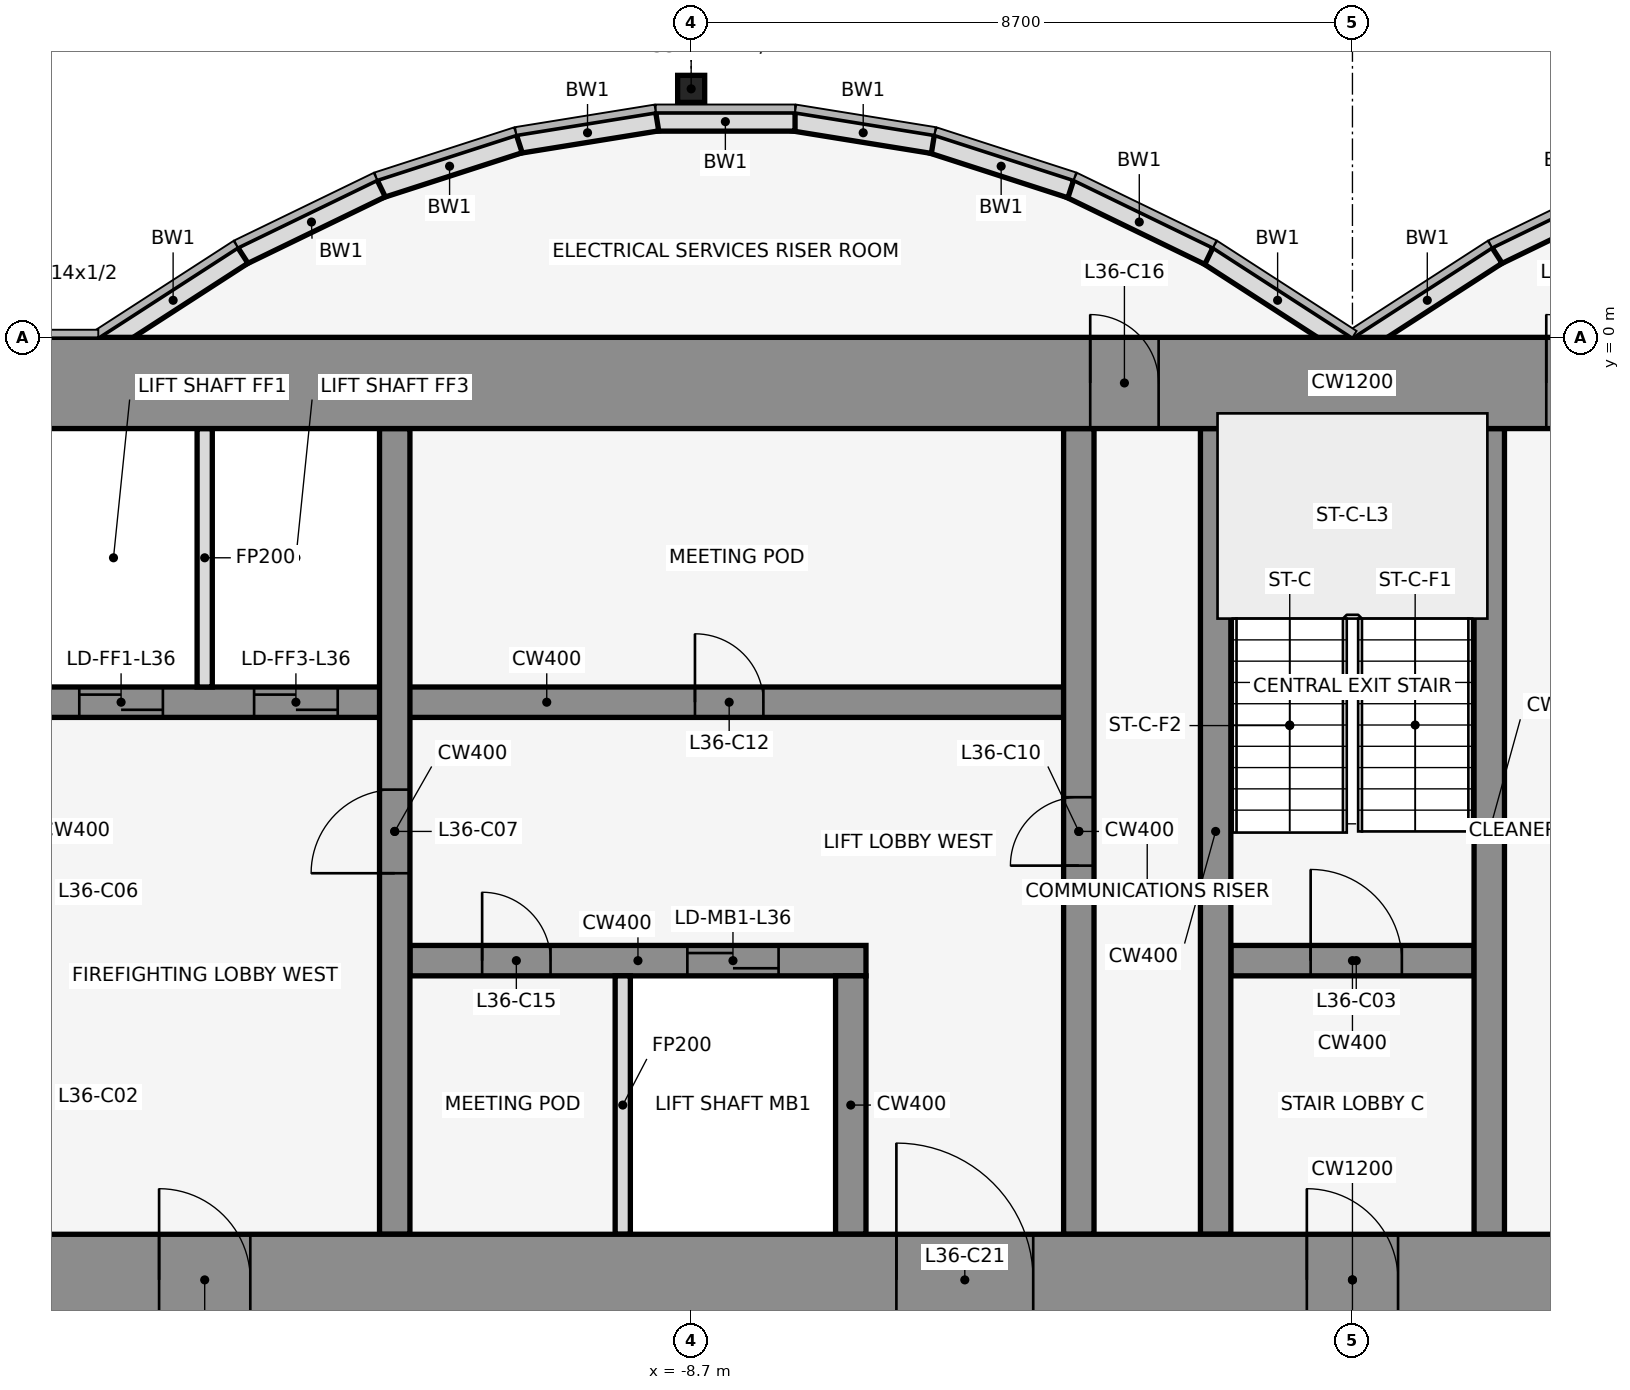
"""IFC4 building model, lengths in metres.
Left out: names, types, materials, properties, quantities, classifications, styles, units other than length and angle.
Written with IfcOpenShell. Run it as: python <this file> out.ifc"""

import sys

from ifc_helpers import new_model, si_unit, direction, frame, frame_2d, origin, origin_2d, place, context, subcontext, project, spatial, rectangle, hollow_rectangle, extrude, element, fill, save


model = new_model("IFC4")
c1 = context("Model", 3, precision=1e-05, world=origin(), true_north=direction((0.0, 1.0)))
c2 = subcontext(c1, "Body", "Model", "MODEL_VIEW")
j1 = project(units=[si_unit("LENGTHUNIT", "METRE"), si_unit("PLANEANGLEUNIT", "RADIAN")], contexts=[c1])
p1 = place(None, origin())
s1 = spatial("IfcSite", under=j1, at=p1, CompositionType="ELEMENT")
p2 = place(p1, origin())
s2 = spatial("IfcBuilding", under=s1, at=p2, CompositionType="ELEMENT")
p3 = place(p2, frame((0.0, 0.0, 165.0)))
s3 = spatial("IfcBuildingStorey", under=s2, at=p3, CompositionType="ELEMENT", Elevation=165.0)
p4 = place(p3, frame((-8.7, 3.269, 0.0), z_axis=(0.0, 0.0, 1.0), x_axis=(1.0, 0.0, 0.0)))
e1 = element("IfcColumn", 1, at=p4, inside=s3, PredefinedType="COLUMN", context=c2, shape_type="SweptSolid", body=[
    extrude(hollow_rectangle(XDim=0.356, YDim=0.356, WallThickness=0.012, at=origin_2d()), origin(), (0.0, 0.0, 1.0), 4.1),
])
p5 = place(p3, frame((3.721, 1.962, 0.0), z_axis=(0.0, 0.0, 1.0), x_axis=(-0.89982408427, -0.436252928206, 0.0)))
e2 = element("IfcWall", 2, at=p5, inside=s3, PredefinedType="STANDARD", context=c2, shape_type="SweptSolid", body=[
    extrude(rectangle(XDim=2.038, YDim=0.25, at=frame_2d((1.019, 0.0))), origin(), (0.0, 0.0, 1.0), 3.95),
])
for number, where, z_axis, x_axis in (
    (3, (1.901, 1.08, 0.0), (0.0, 0.0, 1.0), (-0.84, -0.543, 0.0)),
    (4, (-0.068, -0.105, 0.0), (0.0, 0.0, 1.0), (-0.84, 0.543, 0.0)),
):
    element("IfcWall", number, at=place(p3, frame(where, z_axis=z_axis, x_axis=x_axis)), inside=s3, PredefinedType="STANDARD", context=c2, shape_type="SweptSolid", body=[
        extrude(rectangle(XDim=2.183, YDim=0.25, at=frame_2d((1.091, 0.0))), origin(), (0.0, 0.0, 1.0), 3.95),
    ])
p6 = place(p3, frame((-1.888, 1.073, 0.0), z_axis=(0.0, 0.0, 1.0), x_axis=(-0.89982408427, 0.436252928206, 0.0)))
e5 = element("IfcWall", 5, at=p6, inside=s3, PredefinedType="STANDARD", context=c2, shape_type="SweptSolid", body=[
    extrude(rectangle(XDim=2.038, YDim=0.25, at=frame_2d((1.019, 0.0))), origin(), (0.0, 0.0, 1.0), 3.95),
])
p7 = place(p3, frame((-3.705, 1.955, 0.0), z_axis=(0.0, 0.0, 1.0), x_axis=(-0.951495806175, 0.307661714928, 0.0)))
e6 = element("IfcWall", 6, at=p7, inside=s3, PredefinedType="STANDARD", context=c2, shape_type="SweptSolid", body=[
    extrude(rectangle(XDim=1.927, YDim=0.25, at=frame_2d((0.963, 0.0))), origin(), (0.0, 0.0, 1.0), 3.95),
])
p8 = place(p3, frame((-5.52, 2.543, 0.0), z_axis=(0.0, 0.0, 1.0), x_axis=(-0.987181718931, 0.159600293885, 0.0)))
e7 = element("IfcWall", 7, at=p8, inside=s3, PredefinedType="STANDARD", context=c2, shape_type="SweptSolid", body=[
    extrude(rectangle(XDim=1.857, YDim=0.25, at=frame_2d((0.929, 0.0))), origin(), (0.0, 0.0, 1.0), 3.95),
])
p9 = place(p3, frame((-7.333, 2.838, 0.0), z_axis=(0.0, 0.0, 1.0), x_axis=(-1.0, 0.0, 0.0)))
e8 = element("IfcWall", 8, at=p9, inside=s3, PredefinedType="STANDARD", context=c2, shape_type="SweptSolid", body=[
    extrude(rectangle(XDim=1.833, YDim=0.25, at=frame_2d((0.917, 0.0))), origin(), (0.0, 0.0, 1.0), 3.95),
])
p10 = place(p3, frame((-9.147, 2.84, 0.0), z_axis=(0.0, 0.0, 1.0), x_axis=(-0.987181718931, -0.159600293885, 0.0)))
e9 = element("IfcWall", 9, at=p10, inside=s3, PredefinedType="STANDARD", context=c2, shape_type="SweptSolid", body=[
    extrude(rectangle(XDim=1.857, YDim=0.25, at=frame_2d((0.929, 0.0))), origin(), (0.0, 0.0, 1.0), 3.95),
])
p11 = place(p3, frame((-10.962, 2.548, 0.0), z_axis=(0.0, 0.0, 1.0), x_axis=(-0.951495806175, -0.307661714928, 0.0)))
e10 = element("IfcWall", 10, at=p11, inside=s3, PredefinedType="STANDARD", context=c2, shape_type="SweptSolid", body=[
    extrude(rectangle(XDim=1.927, YDim=0.25, at=frame_2d((0.963, 0.0))), origin(), (0.0, 0.0, 1.0), 3.95),
])
p12 = place(p3, frame((-12.779, 1.962, 0.0), z_axis=(0.0, 0.0, 1.0), x_axis=(-0.89982408427, -0.436252928206, 0.0)))
e11 = element("IfcWall", 11, at=p12, inside=s3, PredefinedType="STANDARD", context=c2, shape_type="SweptSolid", body=[
    extrude(rectangle(XDim=2.038, YDim=0.25, at=frame_2d((1.019, 0.0))), origin(), (0.0, 0.0, 1.0), 3.95),
])
p13 = place(p3, frame((-14.599, 1.08, 0.0), z_axis=(0.0, 0.0, 1.0), x_axis=(-0.83981312244, -0.542875602121, 0.0)))
e12 = element("IfcWall", 12, at=p13, inside=s3, PredefinedType="STANDARD", context=c2, shape_type="SweptSolid", body=[
    extrude(rectangle(XDim=2.183, YDim=0.25, at=frame_2d((1.091, 0.0))), origin(), (0.0, 0.0, 1.0), 3.95),
])
p14 = place(p3, frame((-12.4, -8.2, 0.0), z_axis=(0.0, 0.0, 1.0), x_axis=(1.0, 0.0, 0.0)))
e13 = element("IfcWall", 13, at=p14, inside=s3, PredefinedType="SHEAR", context=c2, shape_type="SweptSolid", body=[
    extrude(rectangle(XDim=6.0, YDim=0.4, at=frame_2d((3.0, 0.0))), origin(), (0.0, 0.0, 1.0), 4.1),
])
p15 = place(p14, frame((3.65, 0.0, 0.0)))
e14 = element("IfcOpeningElement", 14, at=p15, cuts=e13, PredefinedType="OPENING", context=c2, shape_type="SweptSolid", body=[
    extrude(rectangle(XDim=1.2, YDim=2.1, at=frame_2d((0.6, 1.05))), frame((0.0, 0.212, 0.0), z_axis=(0.0, -1.0, 0.0), x_axis=(1.0, 0.0, 0.0)), (0.0, 0.0, 1.0), 0.424),
])
p16 = place(p14, frame((0.95, 0.0, 0.0)))
e15 = element("IfcOpeningElement", 15, at=p16, cuts=e13, PredefinedType="OPENING", context=c2, shape_type="SweptSolid", body=[
    extrude(rectangle(XDim=0.9, YDim=2.1, at=frame_2d((0.45, 1.05))), frame((0.0, 0.212, 0.0), z_axis=(0.0, -1.0, 0.0), x_axis=(1.0, 0.0, 0.0)), (0.0, 0.0, 1.0), 0.424),
])
p17 = place(p3, frame((-1.6, -8.2, 0.0), z_axis=(0.0, 0.0, 1.0), x_axis=(1.0, 0.0, 0.0)))
e16 = element("IfcWall", 16, at=p17, inside=s3, PredefinedType="SHEAR", context=c2, shape_type="SweptSolid", body=[
    extrude(rectangle(XDim=3.2, YDim=0.4, at=frame_2d((1.6, 0.0))), origin(), (0.0, 0.0, 1.0), 4.1),
])
p18 = place(p17, frame((1.05, 0.0, 0.0)))
e17 = element("IfcOpeningElement", 17, at=p18, cuts=e16, PredefinedType="OPENING", context=c2, shape_type="SweptSolid", body=[
    extrude(rectangle(XDim=1.2, YDim=2.1, at=frame_2d((0.6, 1.05))), frame((0.0, 0.212, 0.0), z_axis=(0.0, -1.0, 0.0), x_axis=(1.0, 0.0, 0.0)), (0.0, 0.0, 1.0), 0.424),
])
p19 = place(p3, frame((-17.4, -4.8, 0.0), z_axis=(0.0, 0.0, 1.0), x_axis=(1.0, 0.0, 0.0)))
e18 = element("IfcWall", 18, at=p19, inside=s3, PredefinedType="SHEAR", context=c2, shape_type="SweptSolid", body=[
    extrude(rectangle(XDim=13.6, YDim=0.4, at=frame_2d((6.8, 0.0))), origin(), (0.0, 0.0, 1.0), 4.1),
])
p20 = place(p19, frame((0.65, 0.0, 0.0)))
e19 = element("IfcOpeningElement", 19, at=p20, cuts=e18, PredefinedType="OPENING", context=c2, shape_type="SweptSolid", body=[
    extrude(rectangle(XDim=1.1, YDim=2.1, at=frame_2d((0.55, 1.05))), frame((0.0, 0.212, 0.0), z_axis=(0.0, -1.0, 0.0), x_axis=(1.0, 0.0, 0.0)), (0.0, 0.0, 1.0), 0.424),
])
p21 = place(p19, frame((2.95, 0.0, 0.0)))
e20 = element("IfcOpeningElement", 20, at=p21, cuts=e18, PredefinedType="OPENING", context=c2, shape_type="SweptSolid", body=[
    extrude(rectangle(XDim=1.1, YDim=2.1, at=frame_2d((0.55, 1.05))), frame((0.0, 0.212, 0.0), z_axis=(0.0, -1.0, 0.0), x_axis=(1.0, 0.0, 0.0)), (0.0, 0.0, 1.0), 0.424),
])
p22 = place(p19, frame((8.75, 0.0, 0.0)))
e21 = element("IfcOpeningElement", 21, at=p22, cuts=e18, PredefinedType="OPENING", context=c2, shape_type="SweptSolid", body=[
    extrude(rectangle(XDim=0.9, YDim=2.1, at=frame_2d((0.45, 1.05))), frame((0.0, 0.212, 0.0), z_axis=(0.0, -1.0, 0.0), x_axis=(1.0, 0.0, 0.0)), (0.0, 0.0, 1.0), 0.424),
])
p23 = place(p3, frame((-15.1, -4.6, 0.0), z_axis=(0.0, 0.0, 1.0), x_axis=(0.0, 1.0, 0.0)))
e22 = element("IfcWall", 22, at=p23, inside=s3, PredefinedType="PARTITIONING", context=c2, shape_type="SweptSolid", body=[
    extrude(rectangle(XDim=3.4, YDim=0.2, at=frame_2d((1.7, 0.0))), origin(), (0.0, 0.0, 1.0), 2.84),
])
p24 = place(p3, frame((-12.6, -11.8, 0.0), z_axis=(0.0, 0.0, 1.0), x_axis=(0.0, 1.0, 0.0)))
e23 = element("IfcWall", 23, at=p24, inside=s3, PredefinedType="SHEAR", context=c2, shape_type="SweptSolid", body=[
    extrude(rectangle(XDim=10.6, YDim=0.4, at=frame_2d((5.3, 0.0))), origin(), (0.0, 0.0, 1.0), 4.1),
])
p25 = place(p24, frame((4.75, 0.0, 0.0)))
e24 = element("IfcOpeningElement", 24, at=p25, cuts=e23, PredefinedType="OPENING", context=c2, shape_type="SweptSolid", body=[
    extrude(rectangle(XDim=1.1, YDim=2.1, at=frame_2d((0.55, 1.05))), frame((0.0, 0.212, 0.0), z_axis=(0.0, -1.0, 0.0), x_axis=(1.0, 0.0, 0.0)), (0.0, 0.0, 1.0), 0.424),
])
p26 = place(p3, frame((-9.6, -11.8, 0.0), z_axis=(0.0, 0.0, 1.0), x_axis=(0.0, 1.0, 0.0)))
e25 = element("IfcWall", 25, at=p26, inside=s3, PredefinedType="PARTITIONING", context=c2, shape_type="SweptSolid", body=[
    extrude(rectangle(XDim=3.4, YDim=0.2, at=frame_2d((1.7, 0.0))), origin(), (0.0, 0.0, 1.0), 2.84),
])
p27 = place(p3, frame((-6.6, -11.8, 0.0), z_axis=(0.0, 0.0, 1.0), x_axis=(0.0, 1.0, 0.0)))
e26 = element("IfcWall", 26, at=p27, inside=s3, PredefinedType="SHEAR", context=c2, shape_type="SweptSolid", body=[
    extrude(rectangle(XDim=3.4, YDim=0.4, at=frame_2d((1.7, 0.0))), origin(), (0.0, 0.0, 1.0), 4.1),
])
p28 = place(p3, frame((-3.6, -11.8, 0.0), z_axis=(0.0, 0.0, 1.0), x_axis=(0.0, 1.0, 0.0)))
e27 = element("IfcWall", 27, at=p28, inside=s3, PredefinedType="SHEAR", context=c2, shape_type="SweptSolid", body=[
    extrude(rectangle(XDim=10.6, YDim=0.4, at=frame_2d((5.3, 0.0))), origin(), (0.0, 0.0, 1.0), 4.1),
])
p29 = place(p28, frame((4.85, 0.0, 0.0)))
e28 = element("IfcOpeningElement", 28, at=p29, cuts=e27, PredefinedType="OPENING", context=c2, shape_type="SweptSolid", body=[
    extrude(rectangle(XDim=0.9, YDim=2.1, at=frame_2d((0.45, 1.05))), frame((0.0, 0.212, 0.0), z_axis=(0.0, -1.0, 0.0), x_axis=(1.0, 0.0, 0.0)), (0.0, 0.0, 1.0), 0.424),
])
for number, where, z_axis, x_axis in (
    (29, (-1.8, -11.8, 0.0), (0.0, 0.0, 1.0), (0.0, 1.0, 0.0)),
    (30, (1.8, -11.8, 0.0), (0.0, 0.0, 1.0), (0.0, 1.0, 0.0)),
):
    element("IfcWall", number, at=place(p3, frame(where, z_axis=z_axis, x_axis=x_axis)), inside=s3, PredefinedType="SHEAR", context=c2, shape_type="SweptSolid", body=[
        extrude(rectangle(XDim=10.6, YDim=0.4, at=frame_2d((5.3, 0.0))), origin(), (0.0, 0.0, 1.0), 4.1),
    ])
p30 = place(p3, frame((-22.0, -0.6, 0.0), z_axis=(0.0, 0.0, 1.0), x_axis=(1.0, 0.0, 0.0)))
e31 = element("IfcWall", 31, at=p30, inside=s3, PredefinedType="SHEAR", context=c2, shape_type="SweptSolid", body=[
    extrude(rectangle(XDim=44.0, YDim=1.2, at=frame_2d((22.0, 0.0))), origin(), (0.0, 0.0, 1.0), 4.1),
])
p31 = place(p30, frame((18.55, 0.0, 0.0)))
e32 = element("IfcOpeningElement", 32, at=p31, cuts=e31, PredefinedType="OPENING", context=c2, shape_type="SweptSolid", body=[
    extrude(rectangle(XDim=0.9, YDim=2.1, at=frame_2d((0.45, 1.05))), frame((0.0, 0.612, 0.0), z_axis=(0.0, -1.0, 0.0), x_axis=(1.0, 0.0, 0.0)), (0.0, 0.0, 1.0), 1.224),
])
p32 = place(p30, frame((24.55, 0.0, 0.0)))
e33 = element("IfcOpeningElement", 33, at=p32, cuts=e31, PredefinedType="OPENING", context=c2, shape_type="SweptSolid", body=[
    extrude(rectangle(XDim=0.9, YDim=2.1, at=frame_2d((0.45, 1.05))), frame((0.0, 0.612, 0.0), z_axis=(0.0, -1.0, 0.0), x_axis=(1.0, 0.0, 0.0)), (0.0, 0.0, 1.0), 1.224),
])
p33 = place(p3, frame((-22.0, -12.4, 0.0), z_axis=(0.0, 0.0, 1.0), x_axis=(1.0, 0.0, 0.0)))
e34 = element("IfcWall", 34, at=p33, inside=s3, PredefinedType="SHEAR", context=c2, shape_type="SweptSolid", body=[
    extrude(rectangle(XDim=44.0, YDim=1.2, at=frame_2d((22.0, 0.0))), origin(), (0.0, 0.0, 1.0), 4.1),
])
p34 = place(p33, frame((2.2, 0.0, 0.0)))
e35 = element("IfcOpeningElement", 35, at=p34, cuts=e34, PredefinedType="OPENING", context=c2, shape_type="SweptSolid", body=[
    extrude(rectangle(XDim=1.2, YDim=2.1, at=frame_2d((0.6, 1.05))), frame((0.0, 0.612, 0.0), z_axis=(0.0, -1.0, 0.0), x_axis=(1.0, 0.0, 0.0)), (0.0, 0.0, 1.0), 1.224),
])
p35 = place(p33, frame((21.4, 0.0, 0.0)))
e36 = element("IfcOpeningElement", 36, at=p35, cuts=e34, PredefinedType="OPENING", context=c2, shape_type="SweptSolid", body=[
    extrude(rectangle(XDim=1.2, YDim=2.1, at=frame_2d((0.6, 1.05))), frame((0.0, 0.612, 0.0), z_axis=(0.0, -1.0, 0.0), x_axis=(1.0, 0.0, 0.0)), (0.0, 0.0, 1.0), 1.224),
])
p36 = place(p33, frame((40.6, 0.0, 0.0)))
e37 = element("IfcOpeningElement", 37, at=p36, cuts=e34, PredefinedType="OPENING", context=c2, shape_type="SweptSolid", body=[
    extrude(rectangle(XDim=1.2, YDim=2.1, at=frame_2d((0.6, 1.05))), frame((0.0, 0.612, 0.0), z_axis=(0.0, -1.0, 0.0), x_axis=(1.0, 0.0, 0.0)), (0.0, 0.0, 1.0), 1.224),
])
p37 = place(p33, frame((16.0, 0.0, 0.0)))
e38 = element("IfcOpeningElement", 38, at=p37, cuts=e34, PredefinedType="OPENING", context=c2, shape_type="SweptSolid", body=[
    extrude(rectangle(XDim=1.8, YDim=2.1, at=frame_2d((0.9, 1.05))), frame((0.0, 0.612, 0.0), z_axis=(0.0, -1.0, 0.0), x_axis=(1.0, 0.0, 0.0)), (0.0, 0.0, 1.0), 1.224),
])
p38 = place(p33, frame((6.3, 0.0, 0.0)))
e39 = element("IfcOpeningElement", 39, at=p38, cuts=e34, PredefinedType="OPENING", context=c2, shape_type="SweptSolid", body=[
    extrude(rectangle(XDim=1.2, YDim=2.1, at=frame_2d((0.6, 1.05))), frame((0.0, 0.612, 0.0), z_axis=(0.0, -1.0, 0.0), x_axis=(1.0, 0.0, 0.0)), (0.0, 0.0, 1.0), 1.224),
])
p39 = place(p33, frame((26.2, 0.0, 0.0)))
e40 = element("IfcOpeningElement", 40, at=p39, cuts=e34, PredefinedType="OPENING", context=c2, shape_type="SweptSolid", body=[
    extrude(rectangle(XDim=1.8, YDim=2.1, at=frame_2d((0.9, 1.05))), frame((0.0, 0.612, 0.0), z_axis=(0.0, -1.0, 0.0), x_axis=(1.0, 0.0, 0.0)), (0.0, 0.0, 1.0), 1.224),
])
p40 = place(p33, frame((36.5, 0.0, 0.0)))
e41 = element("IfcOpeningElement", 41, at=p40, cuts=e34, PredefinedType="OPENING", context=c2, shape_type="SweptSolid", body=[
    extrude(rectangle(XDim=1.2, YDim=2.1, at=frame_2d((0.6, 1.05))), frame((0.0, 0.612, 0.0), z_axis=(0.0, -1.0, 0.0), x_axis=(1.0, 0.0, 0.0)), (0.0, 0.0, 1.0), 1.224),
])
p41 = place(p18, origin())
e42 = element("IfcDoor", 42, at=p41, inside=s3, OperationType="SINGLE_SWING_LEFT", PredefinedType="DOOR", context=c2, shape_type="SweptSolid", body=[
    extrude(rectangle(XDim=1.2, YDim=2.1, at=frame_2d((0.6, 1.05))), frame((0.0, 0.025, 0.0), z_axis=(0.0, -1.0, 0.0), x_axis=(1.0, 0.0, 0.0)), (0.0, 0.0, 1.0), 0.05),
])
fill(e17, e42)
p42 = place(p20, origin())
e43 = element("IfcDoor", 43, at=p42, inside=s3, OperationType="DOUBLE_DOOR_SLIDING", PredefinedType="DOOR", context=c2, shape_type="SweptSolid", body=[
    extrude(rectangle(XDim=1.1, YDim=2.1, at=frame_2d((0.55, 1.05))), frame((0.0, 0.025, 0.0), z_axis=(0.0, -1.0, 0.0), x_axis=(1.0, 0.0, 0.0)), (0.0, 0.0, 1.0), 0.05),
])
fill(e19, e43)
p43 = place(p21, origin())
e44 = element("IfcDoor", 44, at=p43, inside=s3, OperationType="DOUBLE_DOOR_SLIDING", PredefinedType="DOOR", context=c2, shape_type="SweptSolid", body=[
    extrude(rectangle(XDim=1.1, YDim=2.1, at=frame_2d((0.55, 1.05))), frame((0.0, 0.025, 0.0), z_axis=(0.0, -1.0, 0.0), x_axis=(1.0, 0.0, 0.0)), (0.0, 0.0, 1.0), 0.05),
])
fill(e20, e44)
p44 = place(p15, origin())
e45 = element("IfcDoor", 45, at=p44, inside=s3, OperationType="DOUBLE_DOOR_SLIDING", PredefinedType="DOOR", context=c2, shape_type="SweptSolid", body=[
    extrude(rectangle(XDim=1.2, YDim=2.1, at=frame_2d((0.6, 1.05))), frame((0.0, 0.025, 0.0), z_axis=(0.0, -1.0, 0.0), x_axis=(1.0, 0.0, 0.0)), (0.0, 0.0, 1.0), 0.05),
])
fill(e14, e45)
p45 = place(p25, origin())
e46 = element("IfcDoor", 46, at=p45, inside=s3, OperationType="SINGLE_SWING_LEFT", PredefinedType="DOOR", context=c2, shape_type="SweptSolid", body=[
    extrude(rectangle(XDim=1.1, YDim=2.1, at=frame_2d((0.55, 1.05))), frame((0.0, 0.025, 0.0), z_axis=(0.0, -1.0, 0.0), x_axis=(1.0, 0.0, 0.0)), (0.0, 0.0, 1.0), 0.05),
])
fill(e24, e46)
p46 = place(p29, frame((0.9, 0.0, 0.0), z_axis=(0.0, 0.0, 1.0), x_axis=(-1.0, 0.0, 0.0)))
e47 = element("IfcDoor", 47, at=p46, inside=s3, OperationType="SINGLE_SWING_LEFT", PredefinedType="DOOR", context=c2, shape_type="SweptSolid", body=[
    extrude(rectangle(XDim=0.9, YDim=2.1, at=frame_2d((0.45, 1.05))), frame((0.0, 0.025, 0.0), z_axis=(0.0, -1.0, 0.0), x_axis=(1.0, 0.0, 0.0)), (0.0, 0.0, 1.0), 0.05),
])
fill(e28, e47)
p47 = place(p22, origin())
e48 = element("IfcDoor", 48, at=p47, inside=s3, OperationType="SINGLE_SWING_RIGHT", PredefinedType="DOOR", context=c2, shape_type="SweptSolid", body=[
    extrude(rectangle(XDim=0.9, YDim=2.1, at=frame_2d((0.45, 1.05))), frame((0.0, 0.025, 0.0), z_axis=(0.0, -1.0, 0.0), x_axis=(1.0, 0.0, 0.0)), (0.0, 0.0, 1.0), 0.05),
])
fill(e21, e48)
p48 = place(p16, frame((0.9, 0.0, 0.0), z_axis=(0.0, 0.0, 1.0), x_axis=(-1.0, 0.0, 0.0)))
e49 = element("IfcDoor", 49, at=p48, inside=s3, OperationType="SINGLE_SWING_RIGHT", PredefinedType="DOOR", context=c2, shape_type="SweptSolid", body=[
    extrude(rectangle(XDim=0.9, YDim=2.1, at=frame_2d((0.45, 1.05))), frame((0.0, 0.025, 0.0), z_axis=(0.0, -1.0, 0.0), x_axis=(1.0, 0.0, 0.0)), (0.0, 0.0, 1.0), 0.05),
])
fill(e15, e49)
p49 = place(p31, origin())
e50 = element("IfcDoor", 50, at=p49, inside=s3, OperationType="SINGLE_SWING_LEFT", PredefinedType="DOOR", context=c2, shape_type="SweptSolid", body=[
    extrude(rectangle(XDim=0.9, YDim=2.1, at=frame_2d((0.45, 1.05))), frame((0.0, 0.025, 0.0), z_axis=(0.0, -1.0, 0.0), x_axis=(1.0, 0.0, 0.0)), (0.0, 0.0, 1.0), 0.05),
])
fill(e32, e50)
p50 = place(p32, origin())
e51 = element("IfcDoor", 51, at=p50, inside=s3, OperationType="SINGLE_SWING_LEFT", PredefinedType="DOOR", context=c2, shape_type="SweptSolid", body=[
    extrude(rectangle(XDim=0.9, YDim=2.1, at=frame_2d((0.45, 1.05))), frame((0.0, 0.025, 0.0), z_axis=(0.0, -1.0, 0.0), x_axis=(1.0, 0.0, 0.0)), (0.0, 0.0, 1.0), 0.05),
])
fill(e33, e51)
p51 = place(p35, frame((1.2, 0.0, 0.0), z_axis=(0.0, 0.0, 1.0), x_axis=(-1.0, 0.0, 0.0)))
e52 = element("IfcDoor", 52, at=p51, inside=s3, OperationType="SINGLE_SWING_RIGHT", PredefinedType="DOOR", context=c2, shape_type="SweptSolid", body=[
    extrude(rectangle(XDim=1.2, YDim=2.1, at=frame_2d((0.6, 1.05))), frame((0.0, 0.025, 0.0), z_axis=(0.0, -1.0, 0.0), x_axis=(1.0, 0.0, 0.0)), (0.0, 0.0, 1.0), 0.05),
])
fill(e36, e52)
p52 = place(p37, origin())
e53 = element("IfcDoor", 53, at=p52, inside=s3, OperationType="SINGLE_SWING_LEFT", PredefinedType="DOOR", context=c2, shape_type="SweptSolid", body=[
    extrude(rectangle(XDim=1.8, YDim=2.1, at=frame_2d((0.9, 1.05))), frame((0.0, 0.025, 0.0), z_axis=(0.0, -1.0, 0.0), x_axis=(1.0, 0.0, 0.0)), (0.0, 0.0, 1.0), 0.05),
])
fill(e38, e53)
p53 = place(p38, frame((1.2, 0.0, 0.0), z_axis=(0.0, 0.0, 1.0), x_axis=(-1.0, 0.0, 0.0)))
e54 = element("IfcDoor", 54, at=p53, inside=s3, OperationType="SINGLE_SWING_RIGHT", PredefinedType="DOOR", context=c2, shape_type="SweptSolid", body=[
    extrude(rectangle(XDim=1.2, YDim=2.1, at=frame_2d((0.6, 1.05))), frame((0.0, 0.025, 0.0), z_axis=(0.0, -1.0, 0.0), x_axis=(1.0, 0.0, 0.0)), (0.0, 0.0, 1.0), 0.05),
])
fill(e39, e54)
save(model, sys.argv[1])
